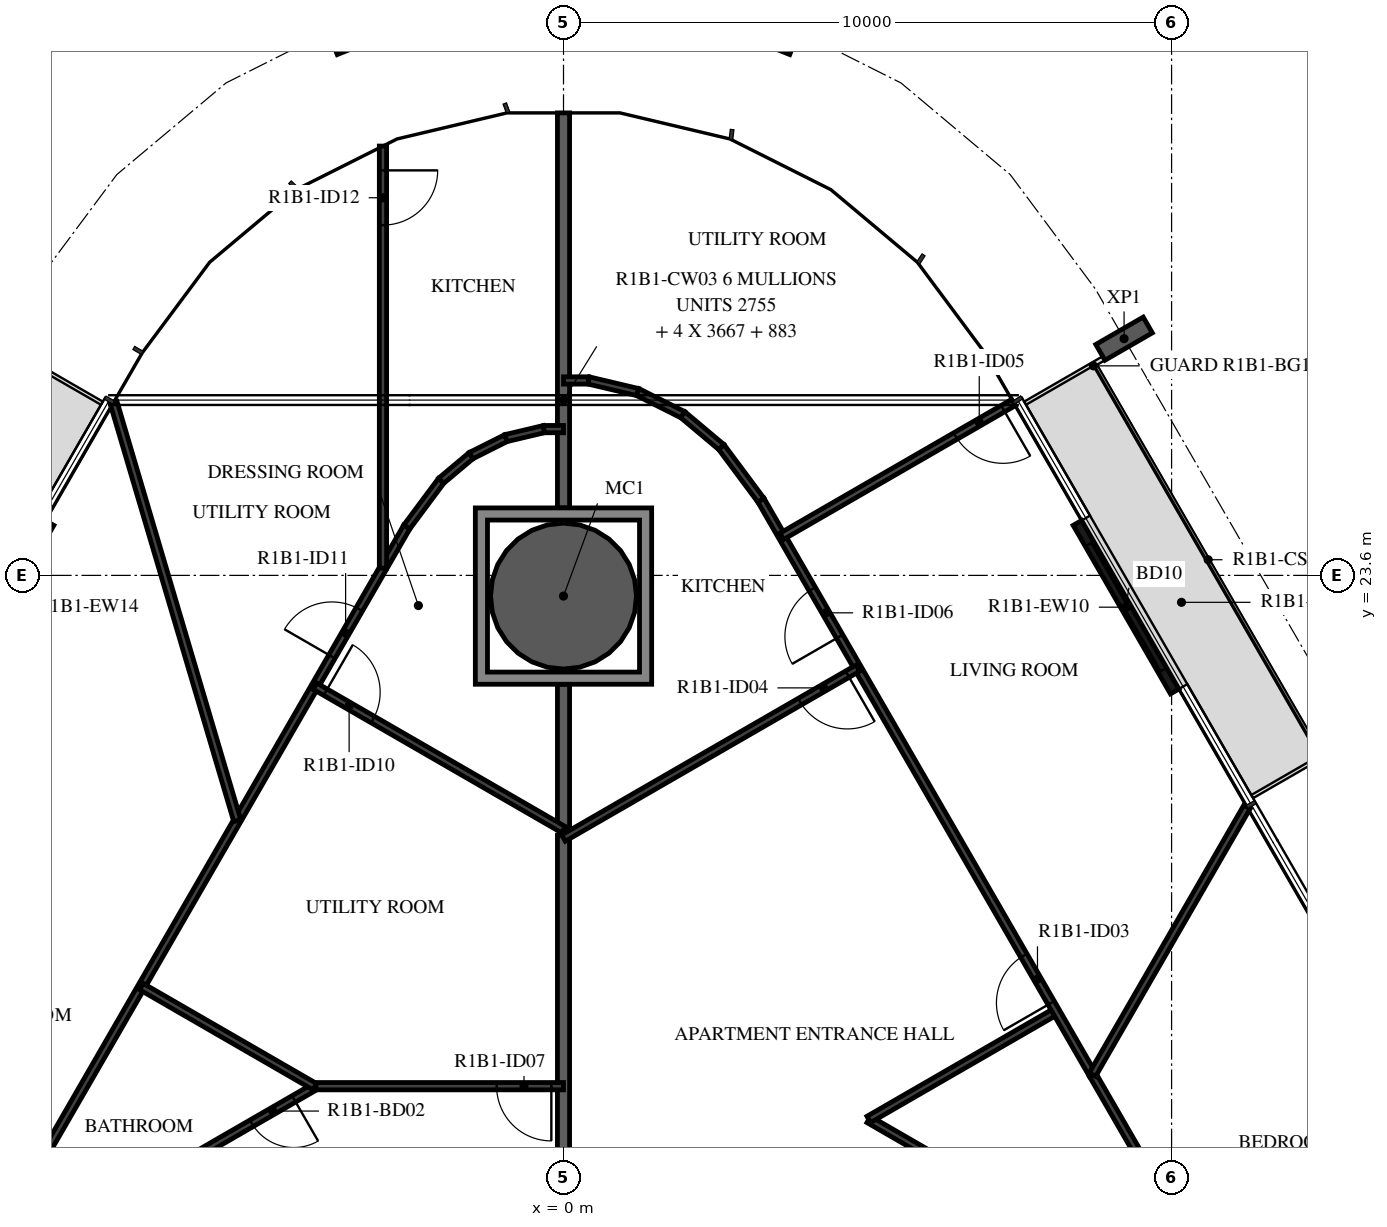
"""IFC4 building model, lengths in metres.
Left out: names, types, materials, properties, quantities, classifications, styles, units other than length and angle.
Written with IfcOpenShell. Run it as: python <this file> out.ifc"""

import sys

from ifc_helpers import new_model, si_unit, direction, frame, frame_2d, origin, origin_2d, place, context, subcontext, project, spatial, polyline, rectangle, hollow_circle, i_section, outline, extrude, element, fill, save


model = new_model("IFC4")
c1 = context("Model", 3, precision=1e-05, world=origin(), true_north=direction((0.0, 1.0)))
c2 = subcontext(c1, "Body", "Model", "MODEL_VIEW")
j1 = project(units=[si_unit("LENGTHUNIT", "METRE"), si_unit("PLANEANGLEUNIT", "RADIAN")], contexts=[c1])
p1 = place(None, origin())
s1 = spatial("IfcSite", under=j1, at=p1, CompositionType="ELEMENT")
p2 = place(p1, origin())
s2 = spatial("IfcBuilding", under=s1, at=p2, CompositionType="ELEMENT")
p3 = place(p2, frame((0.0, 0.0, 48.9)))
s3 = spatial("IfcBuildingStorey", under=s2, at=p3, CompositionType="ELEMENT", Elevation=48.9)
p4 = place(p3, frame((0.0, 23.26, -0.38), z_axis=(0.0, 0.0, 1.0), x_axis=(1.0, 0.0, 0.0)))
e1 = element("IfcColumn", 1, at=p4, inside=s3, PredefinedType="COLUMN", context=c2, shape_type="SweptSolid", body=[
    extrude(hollow_circle(Radius=1.2, WallThickness=0.06, at=origin_2d()), origin(), (0.0, 0.0, 1.0), 3.5),
])
for number, where, z_axis, x_axis in (
    (2, (9.219, 27.493, -0.38), (0.0, 0.0, 1.0), (0.5, -0.866, 0.0)),
    (3, (3.748, 32.639, -0.38), (0.0, 0.0, 1.0), (0.929, -0.371, 0.0)),
    (4, (-3.748, 32.639, -0.38), (0.0, 0.0, 1.0), (0.929, 0.371, 0.0)),
):
    element("IfcColumn", number, at=place(p3, frame(where, z_axis=z_axis, x_axis=x_axis)), inside=s3, PredefinedType="COLUMN", context=c2, shape_type="SweptSolid", body=[
        extrude(i_section(OverallWidth=0.3, OverallDepth=0.9, WebThickness=0.019, FlangeThickness=0.035, FilletRadius=0.03, at=origin_2d()), origin(), (0.0, 0.0, 1.0), 3.5),
    ])
p5 = place(p3, frame((10.051, 21.692, 0.0), z_axis=(0.0, 0.0, 1.0), x_axis=(-0.499971222258, 0.866042017984, 0.0)))
e5 = element("IfcWall", 5, at=p5, inside=s3, PredefinedType="STANDARD", context=c2, shape_type="SweptSolid", body=[
    extrude(rectangle(XDim=3.2, YDim=0.16, at=frame_2d((1.6, 0.0))), origin(), (0.0, 0.0, 1.0), 3.12),
])
p6 = place(p5, frame((0.4, 0.0, 0.0)))
e6 = element("IfcOpeningElement", 6, at=p6, cuts=e5, PredefinedType="OPENING", context=c2, shape_type="SweptSolid", body=[
    extrude(rectangle(XDim=2.4, YDim=2.4, at=frame_2d((1.2, 1.2))), frame((0.0, 0.09, 0.0), z_axis=(0.0, -1.0, 0.0), x_axis=(1.0, 0.0, 0.0)), (0.0, 0.0, 1.0), 0.18),
])
p7 = place(p3, frame((-8.451, 24.463, 0.0), z_axis=(0.0, 0.0, 1.0), x_axis=(-0.499971222258, -0.866042017984, 0.0)))
e7 = element("IfcWall", 7, at=p7, inside=s3, PredefinedType="STANDARD", context=c2, shape_type="SweptSolid", body=[
    extrude(rectangle(XDim=3.2, YDim=0.16, at=frame_2d((1.6, 0.0))), origin(), (0.0, 0.0, 1.0), 3.12),
])
p8 = place(p7, frame((0.4, 0.0, 0.0)))
e8 = element("IfcOpeningElement", 8, at=p8, cuts=e7, PredefinedType="OPENING", context=c2, shape_type="SweptSolid", body=[
    extrude(rectangle(XDim=2.4, YDim=2.4, at=frame_2d((1.2, 1.2))), frame((0.0, 0.09, 0.0), z_axis=(0.0, -1.0, 0.0), x_axis=(1.0, 0.0, 0.0)), (0.0, 0.0, 1.0), 0.18),
])
p9 = place(p3, frame((0.0, 19.326, 0.0), z_axis=(0.0, 0.0, 1.0), x_axis=(0.0, -1.0, 0.0)))
e9 = element("IfcWall", 9, at=p9, inside=s3, PredefinedType="STANDARD", context=c2, shape_type="SweptSolid", body=[
    extrude(rectangle(XDim=5.626, YDim=0.2, at=frame_2d((2.813, 0.0))), origin(), (0.0, 0.0, 1.0), 3.12),
])
p10 = place(p3, frame((0.0, 31.206, 0.0), z_axis=(0.0, 0.0, 1.0), x_axis=(0.0, -1.0, 0.0)))
e10 = element("IfcWall", 10, at=p10, inside=s3, PredefinedType="STANDARD", context=c2, shape_type="SweptSolid", body=[
    extrude(rectangle(XDim=6.496, YDim=0.2, at=frame_2d((3.248, 0.0))), origin(), (0.0, 0.0, 1.0), 3.12),
])
p11 = place(p3, frame((0.0, 21.81, 0.0), z_axis=(0.0, 0.0, 1.0), x_axis=(0.0, -1.0, 0.0)))
e11 = element("IfcWall", 11, at=p11, inside=s3, PredefinedType="STANDARD", context=c2, shape_type="SweptSolid", body=[
    extrude(rectangle(XDim=2.392, YDim=0.2, at=frame_2d((1.196, 0.0))), origin(), (0.0, 0.0, 1.0), 3.12),
])
p12 = place(p3, frame((11.127, 11.127, 0.0), z_axis=(0.0, 0.0, 1.0), x_axis=(-0.86602299963, 0.500004164094, 0.0)))
e12 = element("IfcWall", 12, at=p12, inside=s3, PredefinedType="PARTITIONING", context=c2, shape_type="SweptSolid", body=[
    extrude(rectangle(XDim=7.052, YDim=0.12, at=frame_2d((3.526, 0.0))), origin(), (0.0, 0.0, 1.0), 3.12),
])
p13 = place(p12, frame((1.4, 0.0, 0.0)))
e13 = element("IfcOpeningElement", 13, at=p13, cuts=e12, PredefinedType="OPENING", context=c2, shape_type="SweptSolid", body=[
    extrude(rectangle(XDim=0.8, YDim=2.1, at=frame_2d((0.4, 1.05))), frame((0.0, 0.07, 0.0), z_axis=(0.0, -1.0, 0.0), x_axis=(1.0, 0.0, 0.0)), (0.0, 0.0, 1.0), 0.14),
])
p14 = place(p3, frame((5.02, 14.653, 0.0), z_axis=(0.0, 0.0, 1.0), x_axis=(0.866028940167, 0.499993874756, 0.0)))
e14 = element("IfcWall", 14, at=p14, inside=s3, PredefinedType="PARTITIONING", context=c2, shape_type="SweptSolid", body=[
    extrude(rectangle(XDim=3.556, YDim=0.12, at=frame_2d((1.778, 0.0))), origin(), (0.0, 0.0, 1.0), 3.12),
])
p15 = place(p3, frame((8.7, 15.392, 0.0), z_axis=(0.0, 0.0, 1.0), x_axis=(-0.500002742713, 0.866023820272, 0.0)))
e15 = element("IfcWall", 15, at=p15, inside=s3, PredefinedType="PARTITIONING", context=c2, shape_type="SweptSolid", body=[
    extrude(rectangle(XDim=10.908, YDim=0.12, at=frame_2d((5.454, 0.0))), origin(), (0.0, 0.0, 1.0), 3.12),
])
p16 = place(p15, frame((1.36, 0.0, 0.0)))
e16 = element("IfcOpeningElement", 16, at=p16, cuts=e15, PredefinedType="OPENING", context=c2, shape_type="SweptSolid", body=[
    extrude(rectangle(XDim=0.9, YDim=2.1, at=frame_2d((0.45, 1.05))), frame((0.0, 0.07, 0.0), z_axis=(0.0, -1.0, 0.0), x_axis=(1.0, 0.0, 0.0)), (0.0, 0.0, 1.0), 0.14),
])
p17 = place(p15, frame((8.317, 0.0, 0.0)))
e17 = element("IfcOpeningElement", 17, at=p17, cuts=e15, PredefinedType="OPENING", context=c2, shape_type="SweptSolid", body=[
    extrude(rectangle(XDim=0.9, YDim=2.1, at=frame_2d((0.45, 1.05))), frame((0.0, 0.07, 0.0), z_axis=(0.0, -1.0, 0.0), x_axis=(1.0, 0.0, 0.0)), (0.0, 0.0, 1.0), 0.14),
])
p18 = place(p3, frame((4.841, 22.075, 0.0), z_axis=(0.0, 0.0, 1.0), x_axis=(-0.866019751484, -0.500009789943, 0.0)))
e18 = element("IfcWall", 18, at=p18, inside=s3, PredefinedType="PARTITIONING", context=c2, shape_type="SweptSolid", body=[
    extrude(rectangle(XDim=5.59, YDim=0.12, at=frame_2d((2.795, 0.0))), origin(), (0.0, 0.0, 1.0), 3.12),
])
p19 = place(p18, frame((0.2, 0.0, 0.0)))
e19 = element("IfcOpeningElement", 19, at=p19, cuts=e18, PredefinedType="OPENING", context=c2, shape_type="SweptSolid", body=[
    extrude(rectangle(XDim=0.9, YDim=2.1, at=frame_2d((0.45, 1.05))), frame((0.0, 0.07, 0.0), z_axis=(0.0, -1.0, 0.0), x_axis=(1.0, 0.0, 0.0)), (0.0, 0.0, 1.0), 0.14),
])
p20 = place(p3, frame((8.7, 15.392, 0.0), z_axis=(0.0, 0.0, 1.0), x_axis=(0.499986106925, -0.866033424806, 0.0)))
e20 = element("IfcWall", 20, at=p20, inside=s3, PredefinedType="PARTITIONING", context=c2, shape_type="SweptSolid", body=[
    extrude(rectangle(XDim=5.317, YDim=0.12, at=frame_2d((2.659, 0.0))), origin(), (0.0, 0.0, 1.0), 3.12),
])
p21 = place(p3, frame((11.24, 19.792, 0.0), z_axis=(0.0, 0.0, 1.0), x_axis=(-0.499978956711, -0.866037552792, 0.0)))
e21 = element("IfcWall", 21, at=p21, inside=s3, PredefinedType="PARTITIONING", context=c2, shape_type="SweptSolid", body=[
    extrude(rectangle(XDim=5.081, YDim=0.12, at=frame_2d((2.541, 0.0))), origin(), (0.0, 0.0, 1.0), 3.12),
])
p22 = place(p3, frame((7.4, 26.443, 0.0), z_axis=(0.0, 0.0, 1.0), x_axis=(-0.866032203192, -0.499988222896, 0.0)))
e22 = element("IfcWall", 22, at=p22, inside=s3, PredefinedType="PARTITIONING", context=c2, shape_type="SweptSolid", body=[
    extrude(rectangle(XDim=4.4, YDim=0.12, at=frame_2d((2.2, 0.0))), origin(), (0.0, 0.0, 1.0), 2.73),
])
p23 = place(p22, frame((0.2, 0.0, 0.0)))
e23 = element("IfcOpeningElement", 23, at=p23, cuts=e22, PredefinedType="OPENING", context=c2, shape_type="SweptSolid", body=[
    extrude(rectangle(XDim=0.9, YDim=2.1, at=frame_2d((0.45, 1.05))), frame((0.0, 0.07, 0.0), z_axis=(0.0, -1.0, 0.0), x_axis=(1.0, 0.0, 0.0)), (0.0, 0.0, 1.0), 0.14),
])
p24 = place(p3, frame((0.0, 26.806, 0.0), z_axis=(0.0, 0.0, 1.0), x_axis=(1.0, 0.0, 0.0)))
e24 = element("IfcWall", 24, at=p24, inside=s3, PredefinedType="PARTITIONING", context=c2, shape_type="SweptSolid", body=[
    extrude(rectangle(XDim=0.415, YDim=0.12, at=frame_2d((0.207, 0.0))), origin(), (0.0, 0.0, 1.0), 3.12),
])
p25 = place(p3, frame((0.415, 26.806, 0.0), z_axis=(0.0, 0.0, 1.0), x_axis=(0.973048993259, -0.230598475097, 0.0)))
e25 = element("IfcWall", 25, at=p25, inside=s3, PredefinedType="PARTITIONING", context=c2, shape_type="SweptSolid", body=[
    extrude(rectangle(XDim=0.829, YDim=0.12, at=frame_2d((0.415, 0.0))), origin(), (0.0, 0.0, 1.0), 3.12),
])
for number, where, z_axis, x_axis in (
    (26, (1.221, 26.615, 0.0), (0.0, 0.0, 1.0), (0.894, -0.449, 0.0)),
    (27, (1.962, 26.243, 0.0), (0.0, 0.0, 1.0), (0.766, -0.643, 0.0)),
):
    element("IfcWall", number, at=place(p3, frame(where, z_axis=z_axis, x_axis=x_axis)), inside=s3, PredefinedType="PARTITIONING", context=c2, shape_type="SweptSolid", body=[
        extrude(rectangle(XDim=0.829, YDim=0.12, at=frame_2d((0.415, 0.0))), origin(), (0.0, 0.0, 1.0), 3.12),
    ])
p26 = place(p3, frame((2.597, 25.71, 0.0), z_axis=(0.0, 0.0, 1.0), x_axis=(0.59722925597, -0.802070580319, 0.0)))
e28 = element("IfcWall", 28, at=p26, inside=s3, PredefinedType="PARTITIONING", context=c2, shape_type="SweptSolid", body=[
    extrude(rectangle(XDim=1.087, YDim=0.12, at=frame_2d((0.543, 0.0))), origin(), (0.0, 0.0, 1.0), 3.12),
])
p27 = place(p3, frame((0.0, 15.2, 0.0), z_axis=(0.0, 0.0, 1.0), x_axis=(-1.0, 0.0, 0.0)))
e29 = element("IfcWall", 29, at=p27, inside=s3, PredefinedType="PARTITIONING", context=c2, shape_type="SweptSolid", body=[
    extrude(rectangle(XDim=4.073, YDim=0.12, at=frame_2d((2.036, 0.0))), origin(), (0.0, 0.0, 1.0), 3.12),
])
p28 = place(p27, frame((0.2, 0.0, 0.0)))
e30 = element("IfcOpeningElement", 30, at=p28, cuts=e29, PredefinedType="OPENING", context=c2, shape_type="SweptSolid", body=[
    extrude(rectangle(XDim=0.9, YDim=2.1, at=frame_2d((0.45, 1.05))), frame((0.0, 0.07, 0.0), z_axis=(0.0, -1.0, 0.0), x_axis=(1.0, 0.0, 0.0)), (0.0, 0.0, 1.0), 0.14),
])
p29 = place(p3, frame((-4.088, 15.191, 0.0), z_axis=(0.0, 0.0, 1.0), x_axis=(-0.866024500911, -0.50000156382, 0.0)))
e31 = element("IfcWall", 31, at=p29, inside=s3, PredefinedType="PARTITIONING", context=c2, shape_type="SweptSolid", body=[
    extrude(rectangle(XDim=6.587, YDim=0.12, at=frame_2d((3.294, 0.0))), origin(), (0.0, 0.0, 1.0), 3.12),
])
p30 = place(p29, frame((0.4, 0.0, 0.0)))
e32 = element("IfcOpeningElement", 32, at=p30, cuts=e31, PredefinedType="OPENING", context=c2, shape_type="SweptSolid", body=[
    extrude(rectangle(XDim=0.8, YDim=2.1, at=frame_2d((0.4, 1.05))), frame((0.0, 0.07, 0.0), z_axis=(0.0, -1.0, 0.0), x_axis=(1.0, 0.0, 0.0)), (0.0, 0.0, 1.0), 0.14),
])
p31 = place(p3, frame((-9.793, 11.897, 0.0), z_axis=(0.0, 0.0, 1.0), x_axis=(0.499981117606, 0.866036305265, 0.0)))
e33 = element("IfcWall", 33, at=p31, inside=s3, PredefinedType="PARTITIONING", context=c2, shape_type="SweptSolid", body=[
    extrude(rectangle(XDim=14.434, YDim=0.12, at=frame_2d((7.217, 0.0))), origin(), (0.0, 0.0, 1.0), 3.12),
])
p32 = place(p31, frame((11.97, 0.0, 0.0)))
e34 = element("IfcOpeningElement", 34, at=p32, cuts=e33, PredefinedType="OPENING", context=c2, shape_type="SweptSolid", body=[
    extrude(rectangle(XDim=0.9, YDim=2.1, at=frame_2d((0.45, 1.05))), frame((0.0, 0.07, 0.0), z_axis=(0.0, -1.0, 0.0), x_axis=(1.0, 0.0, 0.0)), (0.0, 0.0, 1.0), 0.14),
])
p33 = place(p3, frame((-2.576, 24.398, 0.0), z_axis=(0.0, 0.0, 1.0), x_axis=(0.597273205282, 0.802037853379, 0.0)))
e35 = element("IfcWall", 35, at=p33, inside=s3, PredefinedType="PARTITIONING", context=c2, shape_type="SweptSolid", body=[
    extrude(rectangle(XDim=0.947, YDim=0.12, at=frame_2d((0.473, 0.0))), origin(), (0.0, 0.0, 1.0), 3.12),
])
p34 = place(p3, frame((-2.011, 25.157, 0.0), z_axis=(0.0, 0.0, 1.0), x_axis=(0.76603445255, 0.642799515795, 0.0)))
e36 = element("IfcWall", 36, at=p34, inside=s3, PredefinedType="PARTITIONING", context=c2, shape_type="SweptSolid", body=[
    extrude(rectangle(XDim=0.642, YDim=0.12, at=frame_2d((0.321, 0.0))), origin(), (0.0, 0.0, 1.0), 3.12),
])
p35 = place(p3, frame((-1.519, 25.57, 0.0), z_axis=(0.0, 0.0, 1.0), x_axis=(0.893665331281, 0.448734081239, 0.0)))
e37 = element("IfcWall", 37, at=p35, inside=s3, PredefinedType="PARTITIONING", context=c2, shape_type="SweptSolid", body=[
    extrude(rectangle(XDim=0.642, YDim=0.12, at=frame_2d((0.321, 0.0))), origin(), (0.0, 0.0, 1.0), 3.12),
])
p36 = place(p3, frame((-0.946, 25.858, 0.0), z_axis=(0.0, 0.0, 1.0), x_axis=(0.973066815876, 0.230523256615, 0.0)))
e38 = element("IfcWall", 38, at=p36, inside=s3, PredefinedType="PARTITIONING", context=c2, shape_type="SweptSolid", body=[
    extrude(rectangle(XDim=0.642, YDim=0.12, at=frame_2d((0.321, 0.0))), origin(), (0.0, 0.0, 1.0), 3.12),
])
p37 = place(p3, frame((-0.321, 26.006, 0.0), z_axis=(0.0, 0.0, 1.0), x_axis=(1.0, 0.0, 0.0)))
e39 = element("IfcWall", 39, at=p37, inside=s3, PredefinedType="PARTITIONING", context=c2, shape_type="SweptSolid", body=[
    extrude(rectangle(XDim=0.321, YDim=0.12, at=frame_2d((0.161, 0.0))), origin(), (0.0, 0.0, 1.0), 3.12),
])
p38 = place(p3, frame((-2.969, 30.66, 0.0), z_axis=(0.0, 0.0, 1.0), x_axis=(0.0, -1.0, 0.0)))
e40 = element("IfcWall", 40, at=p38, inside=s3, PredefinedType="PARTITIONING", context=c2, shape_type="SweptSolid", body=[
    extrude(rectangle(XDim=6.943, YDim=0.12, at=frame_2d((3.471, 0.0))), origin(), (0.0, 0.0, 1.0), 3.12),
])
p39 = place(p38, frame((0.4, 0.0, 0.0)))
e41 = element("IfcOpeningElement", 41, at=p39, cuts=e40, PredefinedType="OPENING", context=c2, shape_type="SweptSolid", body=[
    extrude(rectangle(XDim=0.9, YDim=2.1, at=frame_2d((0.45, 1.05))), frame((0.0, 0.07, 0.0), z_axis=(0.0, -1.0, 0.0), x_axis=(1.0, 0.0, 0.0)), (0.0, 0.0, 1.0), 0.14),
])
p40 = place(p3, frame((-4.088, 21.779, 0.0), z_axis=(0.0, 0.0, 1.0), x_axis=(0.866032292145, -0.49998806882, 0.0)))
e42 = element("IfcWall", 42, at=p40, inside=s3, PredefinedType="PARTITIONING", context=c2, shape_type="SweptSolid", body=[
    extrude(rectangle(XDim=4.721, YDim=0.12, at=frame_2d((2.36, 0.0))), origin(), (0.0, 0.0, 1.0), 3.12),
])
p41 = place(p40, frame((0.2, 0.0, 0.0)))
e43 = element("IfcOpeningElement", 43, at=p41, cuts=e42, PredefinedType="OPENING", context=c2, shape_type="SweptSolid", body=[
    extrude(rectangle(XDim=0.9, YDim=2.1, at=frame_2d((0.45, 1.05))), frame((0.0, 0.07, 0.0), z_axis=(0.0, -1.0, 0.0), x_axis=(1.0, 0.0, 0.0)), (0.0, 0.0, 1.0), 0.14),
])
p42 = place(p3, frame((-6.941, 16.838, 0.0), z_axis=(0.0, 0.0, 1.0), x_axis=(0.866017718408, -0.500013311227, 0.0)))
e44 = element("IfcWall", 44, at=p42, inside=s3, PredefinedType="PARTITIONING", context=c2, shape_type="SweptSolid", body=[
    extrude(rectangle(XDim=3.294, YDim=0.12, at=frame_2d((1.647, 0.0))), origin(), (0.0, 0.0, 1.0), 3.12),
])
p43 = place(p3, frame((-7.4, 26.443, 0.0), z_axis=(0.0, 0.0, 1.0), x_axis=(0.283756762476, -0.958896292489, 0.0)))
e45 = element("IfcWall", 45, at=p43, inside=s3, PredefinedType="PARTITIONING", context=c2, shape_type="SweptSolid", body=[
    extrude(rectangle(XDim=7.17, YDim=0.12, at=frame_2d((3.585, 0.0))), origin(), (0.0, 0.0, 1.0), 3.12),
])
p44 = place(p3, origin())
e46 = element("IfcWall", 46, at=p44, inside=s3, PredefinedType="STANDARD", context=c2, shape_type="SweptSolid", body=[
    extrude(outline(polyline([(1.45, 24.71), (1.45, 21.81), (-1.45, 21.81), (-1.45, 24.71), (1.45, 24.71)]), holes=[polyline([(-1.25, 22.01), (1.25, 22.01), (1.25, 24.51), (-1.25, 24.51), (-1.25, 22.01)])]), origin(), (0.0, 0.0, 1.0), 3.12),
])
p45 = place(p6, origin())
e47 = element("IfcDoor", 47, at=p45, inside=s3, OperationType="DOUBLE_DOOR_SLIDING", PredefinedType="DOOR", context=c2, shape_type="SweptSolid", body=[
    extrude(rectangle(XDim=2.4, YDim=2.4, at=frame_2d((1.2, 1.2))), frame((0.0, 0.025, 0.0), z_axis=(0.0, -1.0, 0.0), x_axis=(1.0, 0.0, 0.0)), (0.0, 0.0, 1.0), 0.05),
])
fill(e6, e47)
p46 = place(p16, origin())
e48 = element("IfcDoor", 48, at=p46, inside=s3, OperationType="SINGLE_SWING_RIGHT", PredefinedType="DOOR", context=c2, shape_type="SweptSolid", body=[
    extrude(rectangle(XDim=0.9, YDim=2.1, at=frame_2d((0.45, 1.05))), frame((0.0, 0.025, 0.0), z_axis=(0.0, -1.0, 0.0), x_axis=(1.0, 0.0, 0.0)), (0.0, 0.0, 1.0), 0.05),
])
fill(e16, e48)
p47 = place(p19, origin())
e49 = element("IfcDoor", 49, at=p47, inside=s3, OperationType="SINGLE_SWING_RIGHT", PredefinedType="DOOR", context=c2, shape_type="SweptSolid", body=[
    extrude(rectangle(XDim=0.9, YDim=2.1, at=frame_2d((0.45, 1.05))), frame((0.0, 0.025, 0.0), z_axis=(0.0, -1.0, 0.0), x_axis=(1.0, 0.0, 0.0)), (0.0, 0.0, 1.0), 0.05),
])
fill(e19, e49)
p48 = place(p23, origin())
e50 = element("IfcDoor", 50, at=p48, inside=s3, OperationType="SINGLE_SWING_RIGHT", PredefinedType="DOOR", context=c2, shape_type="SweptSolid", body=[
    extrude(rectangle(XDim=0.9, YDim=2.1, at=frame_2d((0.45, 1.05))), frame((0.0, 0.025, 0.0), z_axis=(0.0, -1.0, 0.0), x_axis=(1.0, 0.0, 0.0)), (0.0, 0.0, 1.0), 0.05),
])
fill(e23, e50)
p49 = place(p17, origin())
e51 = element("IfcDoor", 51, at=p49, inside=s3, OperationType="SINGLE_SWING_LEFT", PredefinedType="DOOR", context=c2, shape_type="SweptSolid", body=[
    extrude(rectangle(XDim=0.9, YDim=2.1, at=frame_2d((0.45, 1.05))), frame((0.0, 0.025, 0.0), z_axis=(0.0, -1.0, 0.0), x_axis=(1.0, 0.0, 0.0)), (0.0, 0.0, 1.0), 0.05),
])
fill(e17, e51)
p50 = place(p28, origin())
e52 = element("IfcDoor", 52, at=p50, inside=s3, OperationType="SINGLE_SWING_RIGHT", PredefinedType="DOOR", context=c2, shape_type="SweptSolid", body=[
    extrude(rectangle(XDim=0.9, YDim=2.1, at=frame_2d((0.45, 1.05))), frame((0.0, 0.025, 0.0), z_axis=(0.0, -1.0, 0.0), x_axis=(1.0, 0.0, 0.0)), (0.0, 0.0, 1.0), 0.05),
])
fill(e30, e52)
p51 = place(p30, origin())
e53 = element("IfcDoor", 53, at=p51, inside=s3, OperationType="SINGLE_SWING_LEFT", PredefinedType="DOOR", context=c2, shape_type="SweptSolid", body=[
    extrude(rectangle(XDim=0.8, YDim=2.1, at=frame_2d((0.4, 1.05))), frame((0.0, 0.025, 0.0), z_axis=(0.0, -1.0, 0.0), x_axis=(1.0, 0.0, 0.0)), (0.0, 0.0, 1.0), 0.05),
])
fill(e32, e53)
p52 = place(p41, origin())
e54 = element("IfcDoor", 54, at=p52, inside=s3, OperationType="SINGLE_SWING_LEFT", PredefinedType="DOOR", context=c2, shape_type="SweptSolid", body=[
    extrude(rectangle(XDim=0.9, YDim=2.1, at=frame_2d((0.45, 1.05))), frame((0.0, 0.025, 0.0), z_axis=(0.0, -1.0, 0.0), x_axis=(1.0, 0.0, 0.0)), (0.0, 0.0, 1.0), 0.05),
])
fill(e43, e54)
p53 = place(p32, origin())
e55 = element("IfcDoor", 55, at=p53, inside=s3, OperationType="SINGLE_SWING_LEFT", PredefinedType="DOOR", context=c2, shape_type="SweptSolid", body=[
    extrude(rectangle(XDim=0.9, YDim=2.1, at=frame_2d((0.45, 1.05))), frame((0.0, 0.025, 0.0), z_axis=(0.0, -1.0, 0.0), x_axis=(1.0, 0.0, 0.0)), (0.0, 0.0, 1.0), 0.05),
])
fill(e34, e55)
p54 = place(p39, origin())
e56 = element("IfcDoor", 56, at=p54, inside=s3, OperationType="SINGLE_SWING_LEFT", PredefinedType="DOOR", context=c2, shape_type="SweptSolid", body=[
    extrude(rectangle(XDim=0.9, YDim=2.1, at=frame_2d((0.45, 1.05))), frame((0.0, 0.025, 0.0), z_axis=(0.0, -1.0, 0.0), x_axis=(1.0, 0.0, 0.0)), (0.0, 0.0, 1.0), 0.05),
])
fill(e41, e56)
save(model, sys.argv[1])
